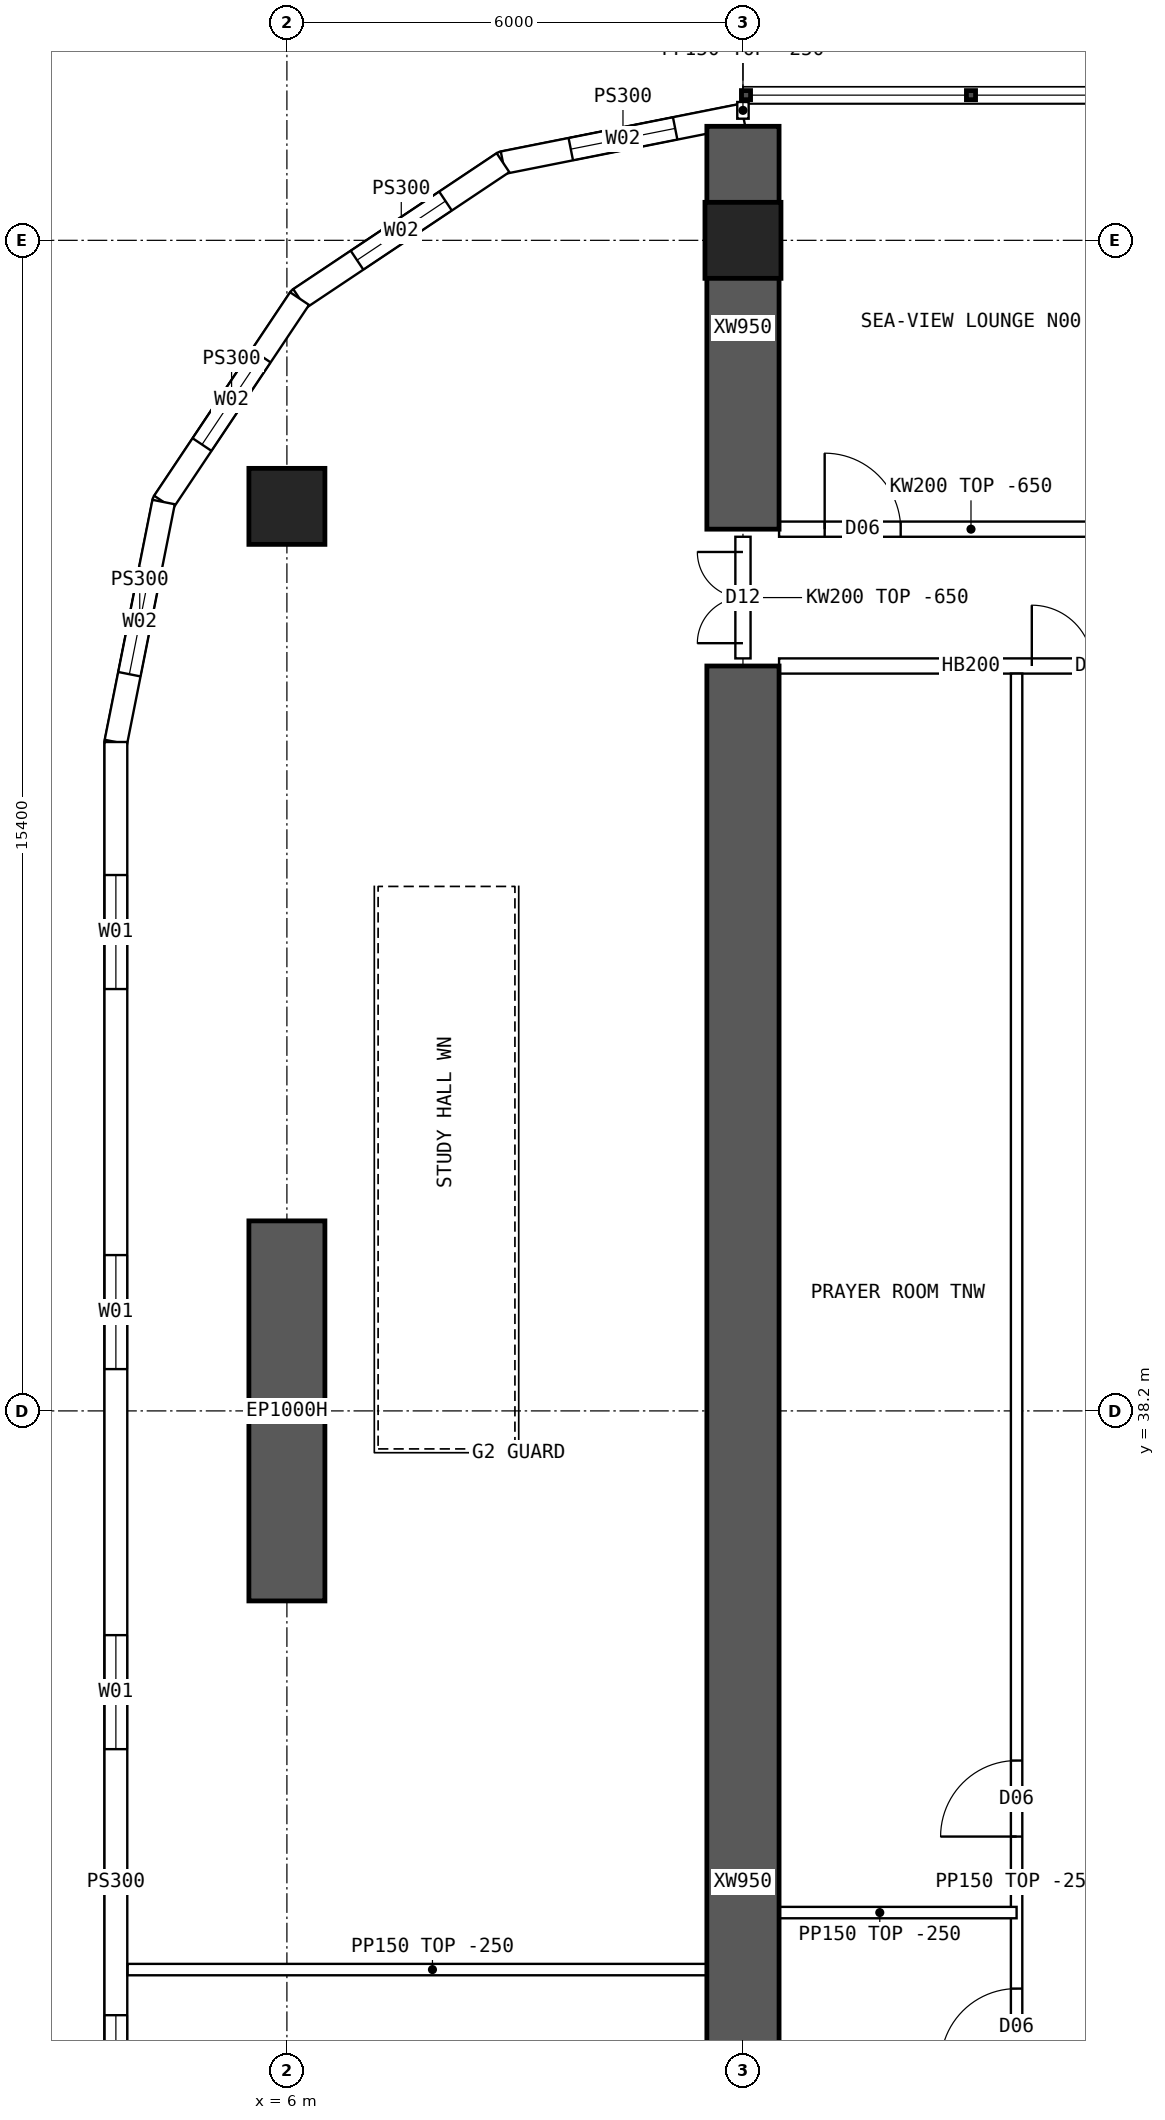
"""IFC4 building model, lengths in metres.
Left out: names, types, materials, properties, quantities, classifications, styles, units other than length and angle.
Written with IfcOpenShell. Run it as: python <this file> out.ifc"""

import sys

from ifc_helpers import new_model, si_unit, direction, frame, frame_2d, origin, origin_2d, place, context, subcontext, project, spatial, polyline, rectangle, hollow_rectangle, outline, extrude, element, fill, save


model = new_model("IFC4")
c1 = context("Model", 3, precision=1e-05, world=origin(), true_north=direction((0.0, 1.0)))
c2 = subcontext(c1, "Body", "Model", "MODEL_VIEW")
j1 = project(units=[si_unit("LENGTHUNIT", "METRE"), si_unit("PLANEANGLEUNIT", "RADIAN")], contexts=[c1])
p1 = place(None, origin())
s1 = spatial("IfcSite", under=j1, at=p1, CompositionType="ELEMENT")
p2 = place(p1, origin())
s2 = spatial("IfcBuilding", under=s1, at=p2, CompositionType="ELEMENT")
p3 = place(p2, frame((0.0, 0.0, 103.15)))
s3 = spatial("IfcBuildingStorey", under=s2, at=p3, CompositionType="ELEMENT", Elevation=103.15)
for number, where, z_axis, x_axis in (
    (1, (12.0, 53.6, 0.0), (0.0, 0.0, 1.0), (1.0, 0.0, 0.0)),
    (2, (6.0, 50.1, 0.0), (0.0, 0.0, 1.0), (1.0, 0.0, 0.0)),
):
    element("IfcColumn", number, at=place(p3, frame(where, z_axis=z_axis, x_axis=x_axis)), inside=s3, PredefinedType="COLUMN", context=c2, shape_type="SweptSolid", body=[
        extrude(hollow_rectangle(XDim=1.0, YDim=1.0, WallThickness=0.1, at=origin_2d()), origin(), (0.0, 0.0, 1.0), 3.75),
    ])
p4 = place(p3, frame((6.0, 35.7, 0.0), z_axis=(0.0, 0.0, 1.0), x_axis=(0.0, 1.0, 0.0)))
e3 = element("IfcWall", 3, at=p4, inside=s3, PredefinedType="SHEAR", context=c2, shape_type="SweptSolid", body=[
    extrude(rectangle(XDim=5.0, YDim=1.0, at=frame_2d((2.5, 0.0))), origin(), (0.0, 0.0, 1.0), 3.75),
])
p5 = place(p3, frame((12.0, 49.8, 0.0), z_axis=(0.0, 0.0, 1.0), x_axis=(0.0, 1.0, 0.0)))
e4 = element("IfcWall", 4, at=p5, inside=s3, PredefinedType="SHEAR", context=c2, shape_type="SweptSolid", body=[
    extrude(rectangle(XDim=5.3, YDim=0.95, at=frame_2d((2.65, 0.0))), origin(), (0.0, 0.0, 1.0), 3.75),
])
p6 = place(p3, frame((12.0, 16.0, 0.0), z_axis=(0.0, 0.0, 1.0), x_axis=(0.0, 1.0, 0.0)))
e5 = element("IfcWall", 5, at=p6, inside=s3, PredefinedType="SHEAR", context=c2, shape_type="SweptSolid", body=[
    extrude(rectangle(XDim=32.0, YDim=0.95, at=frame_2d((16.0, 0.0))), origin(), (0.0, 0.0, 1.0), 3.75),
])
p7 = place(p3, frame((3.75, 47.0, 0.0), z_axis=(0.0, 0.0, 1.0), x_axis=(0.0, -1.0, 0.0)))
e6 = element("IfcWall", 6, at=p7, inside=s3, PredefinedType="SOLIDWALL", context=c2, shape_type="SweptSolid", body=[
    extrude(outline(polyline([(-0.015, -0.15), (30.015, -0.15), (29.985, 0.15), (0.015, 0.15), (-0.015, -0.15)])), origin(), (0.0, 0.0, 1.0), 3.5),
])
p8 = place(p7, frame((1.75, 0.0, 0.9)))
e7 = element("IfcOpeningElement", 7, at=p8, cuts=e6, PredefinedType="OPENING", context=c2, shape_type="SweptSolid", body=[
    extrude(rectangle(XDim=1.5, YDim=2.0, at=frame_2d((0.75, 1.0))), frame((0.0, 0.16, 0.0), z_axis=(0.0, -1.0, 0.0), x_axis=(1.0, 0.0, 0.0)), (0.0, 0.0, 1.0), 0.32),
])
p9 = place(p7, frame((6.75, 0.0, 0.9)))
e8 = element("IfcOpeningElement", 8, at=p9, cuts=e6, PredefinedType="OPENING", context=c2, shape_type="SweptSolid", body=[
    extrude(rectangle(XDim=1.5, YDim=2.0, at=frame_2d((0.75, 1.0))), frame((0.0, 0.16, 0.0), z_axis=(0.0, -1.0, 0.0), x_axis=(1.0, 0.0, 0.0)), (0.0, 0.0, 1.0), 0.32),
])
p10 = place(p7, frame((11.75, 0.0, 0.9)))
e9 = element("IfcOpeningElement", 9, at=p10, cuts=e6, PredefinedType="OPENING", context=c2, shape_type="SweptSolid", body=[
    extrude(rectangle(XDim=1.5, YDim=2.0, at=frame_2d((0.75, 1.0))), frame((0.0, 0.16, 0.0), z_axis=(0.0, -1.0, 0.0), x_axis=(1.0, 0.0, 0.0)), (0.0, 0.0, 1.0), 0.32),
])
p11 = place(p7, frame((16.75, 0.0, 0.9)))
e10 = element("IfcOpeningElement", 10, at=p11, cuts=e6, PredefinedType="OPENING", context=c2, shape_type="SweptSolid", body=[
    extrude(rectangle(XDim=1.5, YDim=2.0, at=frame_2d((0.75, 1.0))), frame((0.0, 0.16, 0.0), z_axis=(0.0, -1.0, 0.0), x_axis=(1.0, 0.0, 0.0)), (0.0, 0.0, 1.0), 0.32),
])
p12 = place(p7, frame((21.75, 0.0, 0.9)))
e11 = element("IfcOpeningElement", 11, at=p12, cuts=e6, PredefinedType="OPENING", context=c2, shape_type="SweptSolid", body=[
    extrude(rectangle(XDim=1.5, YDim=2.0, at=frame_2d((0.75, 1.0))), frame((0.0, 0.16, 0.0), z_axis=(0.0, -1.0, 0.0), x_axis=(1.0, 0.0, 0.0)), (0.0, 0.0, 1.0), 0.32),
])
p13 = place(p7, frame((26.75, 0.0, 0.9)))
e12 = element("IfcOpeningElement", 12, at=p13, cuts=e6, PredefinedType="OPENING", context=c2, shape_type="SweptSolid", body=[
    extrude(rectangle(XDim=1.5, YDim=2.0, at=frame_2d((0.75, 1.0))), frame((0.0, 0.16, 0.0), z_axis=(0.0, -1.0, 0.0), x_axis=(1.0, 0.0, 0.0)), (0.0, 0.0, 1.0), 0.32),
])
p14 = place(p3, frame((12.0, 55.25, 0.0), z_axis=(0.0, 0.0, 1.0), x_axis=(-0.980787251524, -0.195080412259, 0.0)))
e13 = element("IfcWall", 13, at=p14, inside=s3, PredefinedType="SOLIDWALL", context=c2, shape_type="SweptSolid", body=[
    extrude(outline(polyline([(-0.03, -0.15), (3.249, -0.15), (3.189, 0.15), (0.03, 0.15), (-0.03, -0.15)])), origin(), (0.0, 0.0, 1.0), 3.5),
])
p15 = place(p14, frame((0.909, 0.0, 0.9)))
e14 = element("IfcOpeningElement", 14, at=p15, cuts=e13, PredefinedType="OPENING", context=c2, shape_type="SweptSolid", body=[
    extrude(rectangle(XDim=1.4, YDim=1.8, at=frame_2d((0.7, 0.9))), frame((0.0, 0.16, 0.0), z_axis=(0.0, -1.0, 0.0), x_axis=(1.0, 0.0, 0.0)), (0.0, 0.0, 1.0), 0.32),
])
p16 = place(p3, frame((8.843, 54.622, 0.0), z_axis=(0.0, 0.0, 1.0), x_axis=(-0.831443069936, -0.555609954424, 0.0)))
e15 = element("IfcWall", 15, at=p16, inside=s3, PredefinedType="SOLIDWALL", context=c2, shape_type="SweptSolid", body=[
    extrude(outline(polyline([(-0.03, -0.15), (3.249, -0.15), (3.189, 0.15), (0.03, 0.15), (-0.03, -0.15)])), origin(), (0.0, 0.0, 1.0), 3.5),
])
p17 = place(p16, frame((0.909, 0.0, 0.9)))
e16 = element("IfcOpeningElement", 16, at=p17, cuts=e15, PredefinedType="OPENING", context=c2, shape_type="SweptSolid", body=[
    extrude(rectangle(XDim=1.4, YDim=1.8, at=frame_2d((0.7, 0.9))), frame((0.0, 0.16, 0.0), z_axis=(0.0, -1.0, 0.0), x_axis=(1.0, 0.0, 0.0)), (0.0, 0.0, 1.0), 0.32),
])
p18 = place(p3, frame((6.167, 52.833, 0.0), z_axis=(0.0, 0.0, 1.0), x_axis=(-0.555609954424, -0.831443069936, 0.0)))
e17 = element("IfcWall", 17, at=p18, inside=s3, PredefinedType="SOLIDWALL", context=c2, shape_type="SweptSolid", body=[
    extrude(outline(polyline([(-0.03, -0.15), (3.249, -0.15), (3.189, 0.15), (0.03, 0.15), (-0.03, -0.15)])), origin(), (0.0, 0.0, 1.0), 3.5),
])
p19 = place(p18, frame((0.909, 0.0, 0.9)))
e18 = element("IfcOpeningElement", 18, at=p19, cuts=e17, PredefinedType="OPENING", context=c2, shape_type="SweptSolid", body=[
    extrude(rectangle(XDim=1.4, YDim=1.8, at=frame_2d((0.7, 0.9))), frame((0.0, 0.16, 0.0), z_axis=(0.0, -1.0, 0.0), x_axis=(1.0, 0.0, 0.0)), (0.0, 0.0, 1.0), 0.32),
])
p20 = place(p3, frame((4.378, 50.157, 0.0), z_axis=(0.0, 0.0, 1.0), x_axis=(-0.195080412259, -0.980787251524, 0.0)))
e19 = element("IfcWall", 19, at=p20, inside=s3, PredefinedType="SOLIDWALL", context=c2, shape_type="SweptSolid", body=[
    extrude(outline(polyline([(-0.03, -0.15), (3.234, -0.15), (3.204, 0.15), (0.03, 0.15), (-0.03, -0.15)])), origin(), (0.0, 0.0, 1.0), 3.5),
])
p21 = place(p20, frame((0.909, 0.0, 0.9)))
e20 = element("IfcOpeningElement", 20, at=p21, cuts=e19, PredefinedType="OPENING", context=c2, shape_type="SweptSolid", body=[
    extrude(rectangle(XDim=1.4, YDim=1.8, at=frame_2d((0.7, 0.9))), frame((0.0, 0.16, 0.0), z_axis=(0.0, -1.0, 0.0), x_axis=(1.0, 0.0, 0.0)), (0.0, 0.0, 1.0), 0.32),
])
p22 = place(p3, frame((12.475, 49.8, 0.0), z_axis=(0.0, 0.0, 1.0), x_axis=(1.0, 0.0, 0.0)))
e21 = element("IfcWall", 21, at=p22, inside=s3, PredefinedType="SOLIDWALL", context=c2, shape_type="SweptSolid", body=[
    extrude(outline(polyline([(0.0, 0.0), (5.05, 0.0), (5.05, 3.1), (0.0, 3.1), (0.0, 0.0)])), frame((0.0, 0.1, 0.0), z_axis=(0.0, -1.0, 0.0), x_axis=(1.0, 0.0, 0.0)), (0.0, 0.0, 1.0), 0.2),
])
p23 = place(p22, frame((0.6, 0.0, 0.0)))
e22 = element("IfcOpeningElement", 22, at=p23, cuts=e21, PredefinedType="OPENING", context=c2, shape_type="SweptSolid", body=[
    extrude(rectangle(XDim=1.0, YDim=2.1, at=frame_2d((0.5, 1.05))), frame((0.0, 0.11, 0.0), z_axis=(0.0, -1.0, 0.0), x_axis=(1.0, 0.0, 0.0)), (0.0, 0.0, 1.0), 0.22),
])
p24 = place(p3, frame((12.475, 48.0, 0.0), z_axis=(0.0, 0.0, 1.0), x_axis=(1.0, 0.0, 0.0)))
e23 = element("IfcWall", 23, at=p24, inside=s3, PredefinedType="SOLIDWALL", context=c2, shape_type="SweptSolid", body=[
    extrude(rectangle(XDim=5.05, YDim=0.2, at=frame_2d((2.525, 0.0))), origin(), (0.0, 0.0, 1.0), 3.5),
])
p25 = place(p24, frame((3.325, 0.0, 0.0)))
e24 = element("IfcOpeningElement", 24, at=p25, cuts=e23, PredefinedType="OPENING", context=c2, shape_type="SweptSolid", body=[
    extrude(rectangle(XDim=1.6, YDim=2.1, at=frame_2d((0.8, 1.05))), frame((0.0, 0.11, 0.0), z_axis=(0.0, -1.0, 0.0), x_axis=(1.0, 0.0, 0.0)), (0.0, 0.0, 1.0), 0.22),
])
p26 = place(p3, frame((15.6, 16.1, 0.0), z_axis=(0.0, 0.0, 1.0), x_axis=(0.0, 1.0, 0.0)))
e25 = element("IfcWall", 25, at=p26, inside=s3, PredefinedType="PARTITIONING", context=c2, shape_type="SweptSolid", body=[
    extrude(rectangle(XDim=31.8, YDim=0.15, at=frame_2d((15.9, 0.0))), origin(), (0.0, 0.0, 1.0), 3.5),
])
p27 = place(p26, frame((13.5, 0.0, 0.0)))
e26 = element("IfcOpeningElement", 26, at=p27, cuts=e25, PredefinedType="OPENING", context=c2, shape_type="SweptSolid", body=[
    extrude(rectangle(XDim=1.0, YDim=2.1, at=frame_2d((0.5, 1.05))), frame((0.0, 0.085, 0.0), z_axis=(0.0, -1.0, 0.0), x_axis=(1.0, 0.0, 0.0)), (0.0, 0.0, 1.0), 0.17),
])
p28 = place(p26, frame((16.5, 0.0, 0.0)))
e27 = element("IfcOpeningElement", 27, at=p28, cuts=e25, PredefinedType="OPENING", context=c2, shape_type="SweptSolid", body=[
    extrude(rectangle(XDim=1.0, YDim=2.1, at=frame_2d((0.5, 1.05))), frame((0.0, 0.085, 0.0), z_axis=(0.0, -1.0, 0.0), x_axis=(1.0, 0.0, 0.0)), (0.0, 0.0, 1.0), 0.17),
])
p29 = place(p3, frame((12.0, 31.6, 0.0), z_axis=(0.0, 0.0, 1.0), x_axis=(1.0, 0.0, 0.0)))
e28 = element("IfcWall", 28, at=p29, inside=s3, PredefinedType="PARTITIONING", context=c2, shape_type="SweptSolid", body=[
    extrude(rectangle(XDim=3.6, YDim=0.15, at=frame_2d((1.8, 0.0))), origin(), (0.0, 0.0, 1.0), 3.5),
])
p30 = place(p3, frame((3.905, 30.85, 0.0), z_axis=(0.0, 0.0, 1.0), x_axis=(1.0, 0.0, 0.0)))
e29 = element("IfcWall", 29, at=p30, inside=s3, PredefinedType="PARTITIONING", context=c2, shape_type="SweptSolid", body=[
    extrude(outline(polyline([(0.0, 0.0), (8.02, 0.0), (8.02, 3.5), (2.397, 3.5), (2.395, 3.05), (1.797, 3.05), (1.795, 3.5), (0.0, 3.5), (0.0, 0.0)])), frame((0.0, 0.075, 0.0), z_axis=(0.0, -1.0, 0.0), x_axis=(1.0, 0.0, 0.0)), (0.0, 0.0, 1.0), 0.15),
])
p31 = place(p3, frame((12.0, 48.1, 0.0), z_axis=(0.0, 0.0, 1.0), x_axis=(0.0, 1.0, 0.0)))
e30 = element("IfcWall", 30, at=p31, inside=s3, PredefinedType="SOLIDWALL", context=c2, shape_type="SweptSolid", body=[
    extrude(outline(polyline([(0.0, 0.0), (1.6, 0.0), (1.6, 3.1), (0.0, 3.1), (0.0, 0.0)])), frame((0.0, 0.1, 0.0), z_axis=(0.0, -1.0, 0.0), x_axis=(1.0, 0.0, 0.0)), (0.0, 0.0, 1.0), 0.2),
])
p32 = place(p31, frame((0.2, 0.0, 0.0)))
e31 = element("IfcOpeningElement", 31, at=p32, cuts=e30, PredefinedType="OPENING", context=c2, shape_type="SweptSolid", body=[
    extrude(rectangle(XDim=1.2, YDim=2.1, at=frame_2d((0.6, 1.05))), frame((0.0, 0.11, 0.0), z_axis=(0.0, -1.0, 0.0), x_axis=(1.0, 0.0, 0.0)), (0.0, 0.0, 1.0), 0.22),
])
p33 = place(p3, frame((12.0, 55.2, 0.0), z_axis=(0.0, 0.0, 1.0), x_axis=(0.0, 1.0, 0.0)))
e32 = element("IfcWall", 32, at=p33, inside=s3, PredefinedType="PARTITIONING", context=c2, shape_type="SweptSolid", body=[
    extrude(rectangle(XDim=0.22, YDim=0.15, at=frame_2d((0.11, 0.0))), origin(), (0.0, 0.0, 1.0), 3.5),
])
p34 = place(p8, origin())
e33 = element("IfcWindow", 33, at=p34, inside=s3, PartitioningType="SINGLE_PANEL", PredefinedType="WINDOW", context=c2, shape_type="SweptSolid", body=[
    extrude(rectangle(XDim=1.5, YDim=2.0, at=frame_2d((0.75, 1.0))), frame((0.0, 0.03, 0.0), z_axis=(0.0, -1.0, 0.0), x_axis=(1.0, 0.0, 0.0)), (0.0, 0.0, 1.0), 0.06),
])
fill(e7, e33)
p35 = place(p9, origin())
e34 = element("IfcWindow", 34, at=p35, inside=s3, PartitioningType="SINGLE_PANEL", PredefinedType="WINDOW", context=c2, shape_type="SweptSolid", body=[
    extrude(rectangle(XDim=1.5, YDim=2.0, at=frame_2d((0.75, 1.0))), frame((0.0, 0.03, 0.0), z_axis=(0.0, -1.0, 0.0), x_axis=(1.0, 0.0, 0.0)), (0.0, 0.0, 1.0), 0.06),
])
fill(e8, e34)
p36 = place(p10, origin())
e35 = element("IfcWindow", 35, at=p36, inside=s3, PartitioningType="SINGLE_PANEL", PredefinedType="WINDOW", context=c2, shape_type="SweptSolid", body=[
    extrude(rectangle(XDim=1.5, YDim=2.0, at=frame_2d((0.75, 1.0))), frame((0.0, 0.03, 0.0), z_axis=(0.0, -1.0, 0.0), x_axis=(1.0, 0.0, 0.0)), (0.0, 0.0, 1.0), 0.06),
])
fill(e9, e35)
p37 = place(p11, origin())
e36 = element("IfcWindow", 36, at=p37, inside=s3, PartitioningType="SINGLE_PANEL", PredefinedType="WINDOW", context=c2, shape_type="SweptSolid", body=[
    extrude(rectangle(XDim=1.5, YDim=2.0, at=frame_2d((0.75, 1.0))), frame((0.0, 0.03, 0.0), z_axis=(0.0, -1.0, 0.0), x_axis=(1.0, 0.0, 0.0)), (0.0, 0.0, 1.0), 0.06),
])
fill(e10, e36)
p38 = place(p15, origin())
e37 = element("IfcWindow", 37, at=p38, inside=s3, PartitioningType="SINGLE_PANEL", PredefinedType="WINDOW", context=c2, shape_type="SweptSolid", body=[
    extrude(rectangle(XDim=1.4, YDim=1.8, at=frame_2d((0.7, 0.9))), frame((0.0, 0.03, 0.0), z_axis=(0.0, -1.0, 0.0), x_axis=(1.0, 0.0, 0.0)), (0.0, 0.0, 1.0), 0.06),
])
fill(e14, e37)
p39 = place(p17, origin())
e38 = element("IfcWindow", 38, at=p39, inside=s3, PartitioningType="SINGLE_PANEL", PredefinedType="WINDOW", context=c2, shape_type="SweptSolid", body=[
    extrude(rectangle(XDim=1.4, YDim=1.8, at=frame_2d((0.7, 0.9))), frame((0.0, 0.03, 0.0), z_axis=(0.0, -1.0, 0.0), x_axis=(1.0, 0.0, 0.0)), (0.0, 0.0, 1.0), 0.06),
])
fill(e16, e38)
p40 = place(p19, origin())
e39 = element("IfcWindow", 39, at=p40, inside=s3, PartitioningType="SINGLE_PANEL", PredefinedType="WINDOW", context=c2, shape_type="SweptSolid", body=[
    extrude(rectangle(XDim=1.4, YDim=1.8, at=frame_2d((0.7, 0.9))), frame((0.0, 0.03, 0.0), z_axis=(0.0, -1.0, 0.0), x_axis=(1.0, 0.0, 0.0)), (0.0, 0.0, 1.0), 0.06),
])
fill(e18, e39)
p41 = place(p21, origin())
e40 = element("IfcWindow", 40, at=p41, inside=s3, PartitioningType="SINGLE_PANEL", PredefinedType="WINDOW", context=c2, shape_type="SweptSolid", body=[
    extrude(rectangle(XDim=1.4, YDim=1.8, at=frame_2d((0.7, 0.9))), frame((0.0, 0.03, 0.0), z_axis=(0.0, -1.0, 0.0), x_axis=(1.0, 0.0, 0.0)), (0.0, 0.0, 1.0), 0.06),
])
fill(e20, e40)
p42 = place(p25, origin())
e41 = element("IfcDoor", 41, at=p42, inside=s3, OperationType="DOUBLE_DOOR_SINGLE_SWING", PredefinedType="DOOR", context=c2, shape_type="SweptSolid", body=[
    extrude(rectangle(XDim=1.6, YDim=2.1, at=frame_2d((0.8, 1.05))), frame((0.0, 0.025, 0.0), z_axis=(0.0, -1.0, 0.0), x_axis=(1.0, 0.0, 0.0)), (0.0, 0.0, 1.0), 0.05),
])
fill(e24, e41)
p43 = place(p23, origin())
e42 = element("IfcDoor", 42, at=p43, inside=s3, OperationType="SINGLE_SWING_LEFT", PredefinedType="DOOR", context=c2, shape_type="SweptSolid", body=[
    extrude(rectangle(XDim=1.0, YDim=2.1, at=frame_2d((0.5, 1.05))), frame((0.0, 0.025, 0.0), z_axis=(0.0, -1.0, 0.0), x_axis=(1.0, 0.0, 0.0)), (0.0, 0.0, 1.0), 0.05),
])
fill(e22, e42)
p44 = place(p27, origin())
e43 = element("IfcDoor", 43, at=p44, inside=s3, OperationType="SINGLE_SWING_LEFT", PredefinedType="DOOR", context=c2, shape_type="SweptSolid", body=[
    extrude(rectangle(XDim=1.0, YDim=2.1, at=frame_2d((0.5, 1.05))), frame((0.0, 0.025, 0.0), z_axis=(0.0, -1.0, 0.0), x_axis=(1.0, 0.0, 0.0)), (0.0, 0.0, 1.0), 0.05),
])
fill(e26, e43)
p45 = place(p28, origin())
e44 = element("IfcDoor", 44, at=p45, inside=s3, OperationType="SINGLE_SWING_LEFT", PredefinedType="DOOR", context=c2, shape_type="SweptSolid", body=[
    extrude(rectangle(XDim=1.0, YDim=2.1, at=frame_2d((0.5, 1.05))), frame((0.0, 0.025, 0.0), z_axis=(0.0, -1.0, 0.0), x_axis=(1.0, 0.0, 0.0)), (0.0, 0.0, 1.0), 0.05),
])
fill(e27, e44)
p46 = place(p32, origin())
e45 = element("IfcDoor", 45, at=p46, inside=s3, OperationType="DOUBLE_DOOR_SINGLE_SWING", PredefinedType="DOOR", context=c2, shape_type="SweptSolid", body=[
    extrude(rectangle(XDim=1.2, YDim=2.1, at=frame_2d((0.6, 1.05))), frame((0.0, 0.025, 0.0), z_axis=(0.0, -1.0, 0.0), x_axis=(1.0, 0.0, 0.0)), (0.0, 0.0, 1.0), 0.05),
])
fill(e31, e45)
save(model, sys.argv[1])
